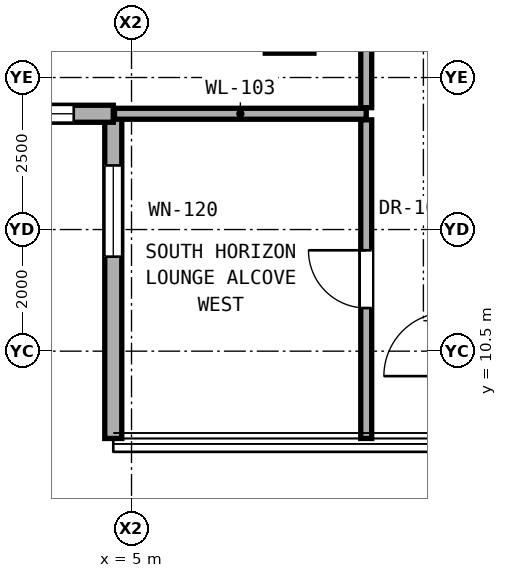
"""IFC4 building model, lengths in metres.
Left out: names, types, materials, properties, quantities, classifications, styles, units other than length and angle.
Written with IfcOpenShell. Run it as: python <this file> out.ifc"""

import sys

from ifc_helpers import new_model, si_unit, direction, frame, frame_2d, origin, origin_2d, place, context, subcontext, project, spatial, rectangle, extrude, element, fill, save


model = new_model("IFC4")
c1 = context("Model", 3, precision=1e-05, world=origin(), true_north=direction((0.0, 1.0)))
c2 = subcontext(c1, "Body", "Model", "MODEL_VIEW")
j1 = project(units=[si_unit("LENGTHUNIT", "METRE"), si_unit("PLANEANGLEUNIT", "RADIAN")], contexts=[c1])
p1 = place(None, origin())
s1 = spatial("IfcSite", under=j1, at=p1, CompositionType="ELEMENT")
p2 = place(p1, origin())
s2 = spatial("IfcBuilding", under=s1, at=p2, CompositionType="ELEMENT")
p3 = place(p2, frame((0.0, 0.0, 58.7)))
s3 = spatial("IfcBuildingStorey", under=s2, at=p3, CompositionType="ELEMENT", Elevation=58.7)
p4 = place(p3, frame((7.6, 16.0, 0.0), z_axis=(0.0, 0.0, 1.0), x_axis=(1.0, 0.0, 0.0)))
e1 = element("IfcColumn", 1, at=p4, inside=s3, PredefinedType="PILASTER", context=c2, shape_type="SweptSolid", body=[
    extrude(rectangle(XDim=0.8, YDim=1.2, at=origin_2d()), origin(), (0.0, 0.0, 1.0), 3.3),
])
p5 = place(p3, frame((4.7, 14.404, 0.0), z_axis=(0.0, 0.0, 1.0), x_axis=(0.0, -1.0, 0.0)))
e2 = element("IfcWall", 2, at=p5, inside=s3, PredefinedType="SOLIDWALL", context=c2, shape_type="SweptSolid", body=[
    extrude(rectangle(XDim=5.34, YDim=0.28, at=frame_2d((2.67, 0.0))), origin(), (0.0, 0.0, 1.0), 3.04),
])
p6 = place(p5, frame((0.85, 0.0, 0.79)))
e3 = element("IfcOpeningElement", 3, at=p6, cuts=e2, PredefinedType="OPENING", context=c2, shape_type="SweptSolid", body=[
    extrude(rectangle(XDim=1.5, YDim=2.1, at=frame_2d((0.75, 1.05))), frame((0.0, 0.15, 0.0), z_axis=(0.0, -1.0, 0.0), x_axis=(1.0, 0.0, 0.0)), (0.0, 0.0, 1.0), 0.3),
])
p7 = place(p3, frame((-0.64, 14.404, 0.0), z_axis=(0.0, 0.0, 1.0), x_axis=(1.0, 0.0, 0.0)))
e4 = element("IfcWall", 4, at=p7, inside=s3, PredefinedType="SOLIDWALL", context=c2, shape_type="SweptSolid", body=[
    extrude(rectangle(XDim=5.34, YDim=0.28, at=frame_2d((2.67, 0.0))), origin(), (0.0, 0.0, 1.0), 3.04),
])
p8 = place(p7, frame((3.59, 0.0, 0.85)))
e5 = element("IfcOpeningElement", 5, at=p8, cuts=e4, PredefinedType="OPENING", context=c2, shape_type="SweptSolid", body=[
    extrude(rectangle(XDim=1.1, YDim=2.0, at=frame_2d((0.55, 1.0))), frame((0.0, 0.15, 0.0), z_axis=(0.0, -1.0, 0.0), x_axis=(1.0, 0.0, 0.0)), (0.0, 0.0, 1.0), 0.3),
])
p9 = place(p3, frame((4.72, 14.404, 0.0), z_axis=(0.0, 0.0, 1.0), x_axis=(1.0, 0.0, 0.0)))
e6 = element("IfcWall", 6, at=p9, inside=s3, PredefinedType="PARTITIONING", context=c2, shape_type="SweptSolid", body=[
    extrude(rectangle(XDim=4.14, YDim=0.18, at=frame_2d((2.07, 0.0))), origin(), (0.0, 0.0, 1.0), 3.06),
])
p10 = place(p3, frame((8.86, 9.064, 0.0), z_axis=(0.0, 0.0, 1.0), x_axis=(0.0, 1.0, 0.0)))
e7 = element("IfcWall", 7, at=p10, inside=s3, PredefinedType="PARTITIONING", context=c2, shape_type="SweptSolid", body=[
    extrude(rectangle(XDim=5.24, YDim=0.18, at=frame_2d((2.62, 0.0))), origin(), (0.0, 0.0, 1.0), 3.06),
])
p11 = place(p10, frame((2.145, 0.0, 0.0)))
e8 = element("IfcOpeningElement", 8, at=p11, cuts=e7, PredefinedType="OPENING", context=c2, shape_type="SweptSolid", body=[
    extrude(rectangle(XDim=0.95, YDim=2.15, at=frame_2d((0.475, 1.075))), frame((0.0, 0.1, 0.0), z_axis=(0.0, -1.0, 0.0), x_axis=(1.0, 0.0, 0.0)), (0.0, 0.0, 1.0), 0.2),
])
p12 = place(p3, frame((8.86, 14.504, 0.0), z_axis=(0.0, 0.0, 1.0), x_axis=(0.0, 1.0, 0.0)))
e9 = element("IfcWall", 9, at=p12, inside=s3, PredefinedType="PARTITIONING", context=c2, shape_type="SweptSolid", body=[
    extrude(rectangle(XDim=9.542, YDim=0.18, at=frame_2d((4.771, 0.0))), origin(), (0.0, 0.0, 1.0), 2.436),
])
p13 = place(p12, frame((4.246, 0.0, 0.0)))
e10 = element("IfcOpeningElement", 10, at=p13, cuts=e9, PredefinedType="OPENING", context=c2, shape_type="SweptSolid", body=[
    extrude(rectangle(XDim=1.05, YDim=2.2, at=frame_2d((0.525, 1.1))), frame((0.0, 0.1, 0.0), z_axis=(0.0, -1.0, 0.0), x_axis=(1.0, 0.0, 0.0)), (0.0, 0.0, 1.0), 0.2),
])
p14 = place(p6, origin())
e11 = element("IfcWindow", 11, at=p14, inside=s3, PartitioningType="SINGLE_PANEL", PredefinedType="WINDOW", context=c2, shape_type="SweptSolid", body=[
    extrude(rectangle(XDim=1.5, YDim=2.1, at=frame_2d((0.75, 1.05))), frame((0.0, 0.03, 0.0), z_axis=(0.0, -1.0, 0.0), x_axis=(1.0, 0.0, 0.0)), (0.0, 0.0, 1.0), 0.06),
])
fill(e3, e11)
p15 = place(p8, origin())
e12 = element("IfcWindow", 12, at=p15, inside=s3, PartitioningType="SINGLE_PANEL", PredefinedType="WINDOW", context=c2, shape_type="SweptSolid", body=[
    extrude(rectangle(XDim=1.1, YDim=2.0, at=frame_2d((0.55, 1.0))), frame((0.0, 0.03, 0.0), z_axis=(0.0, -1.0, 0.0), x_axis=(1.0, 0.0, 0.0)), (0.0, 0.0, 1.0), 0.06),
])
fill(e5, e12)
p16 = place(p11, origin())
e13 = element("IfcDoor", 13, at=p16, inside=s3, OperationType="SINGLE_SWING_RIGHT", PredefinedType="DOOR", context=c2, shape_type="SweptSolid", body=[
    extrude(rectangle(XDim=0.95, YDim=2.15, at=frame_2d((0.475, 1.075))), frame((0.0, 0.025, 0.0), z_axis=(0.0, -1.0, 0.0), x_axis=(1.0, 0.0, 0.0)), (0.0, 0.0, 1.0), 0.05),
])
fill(e8, e13)
save(model, sys.argv[1])
